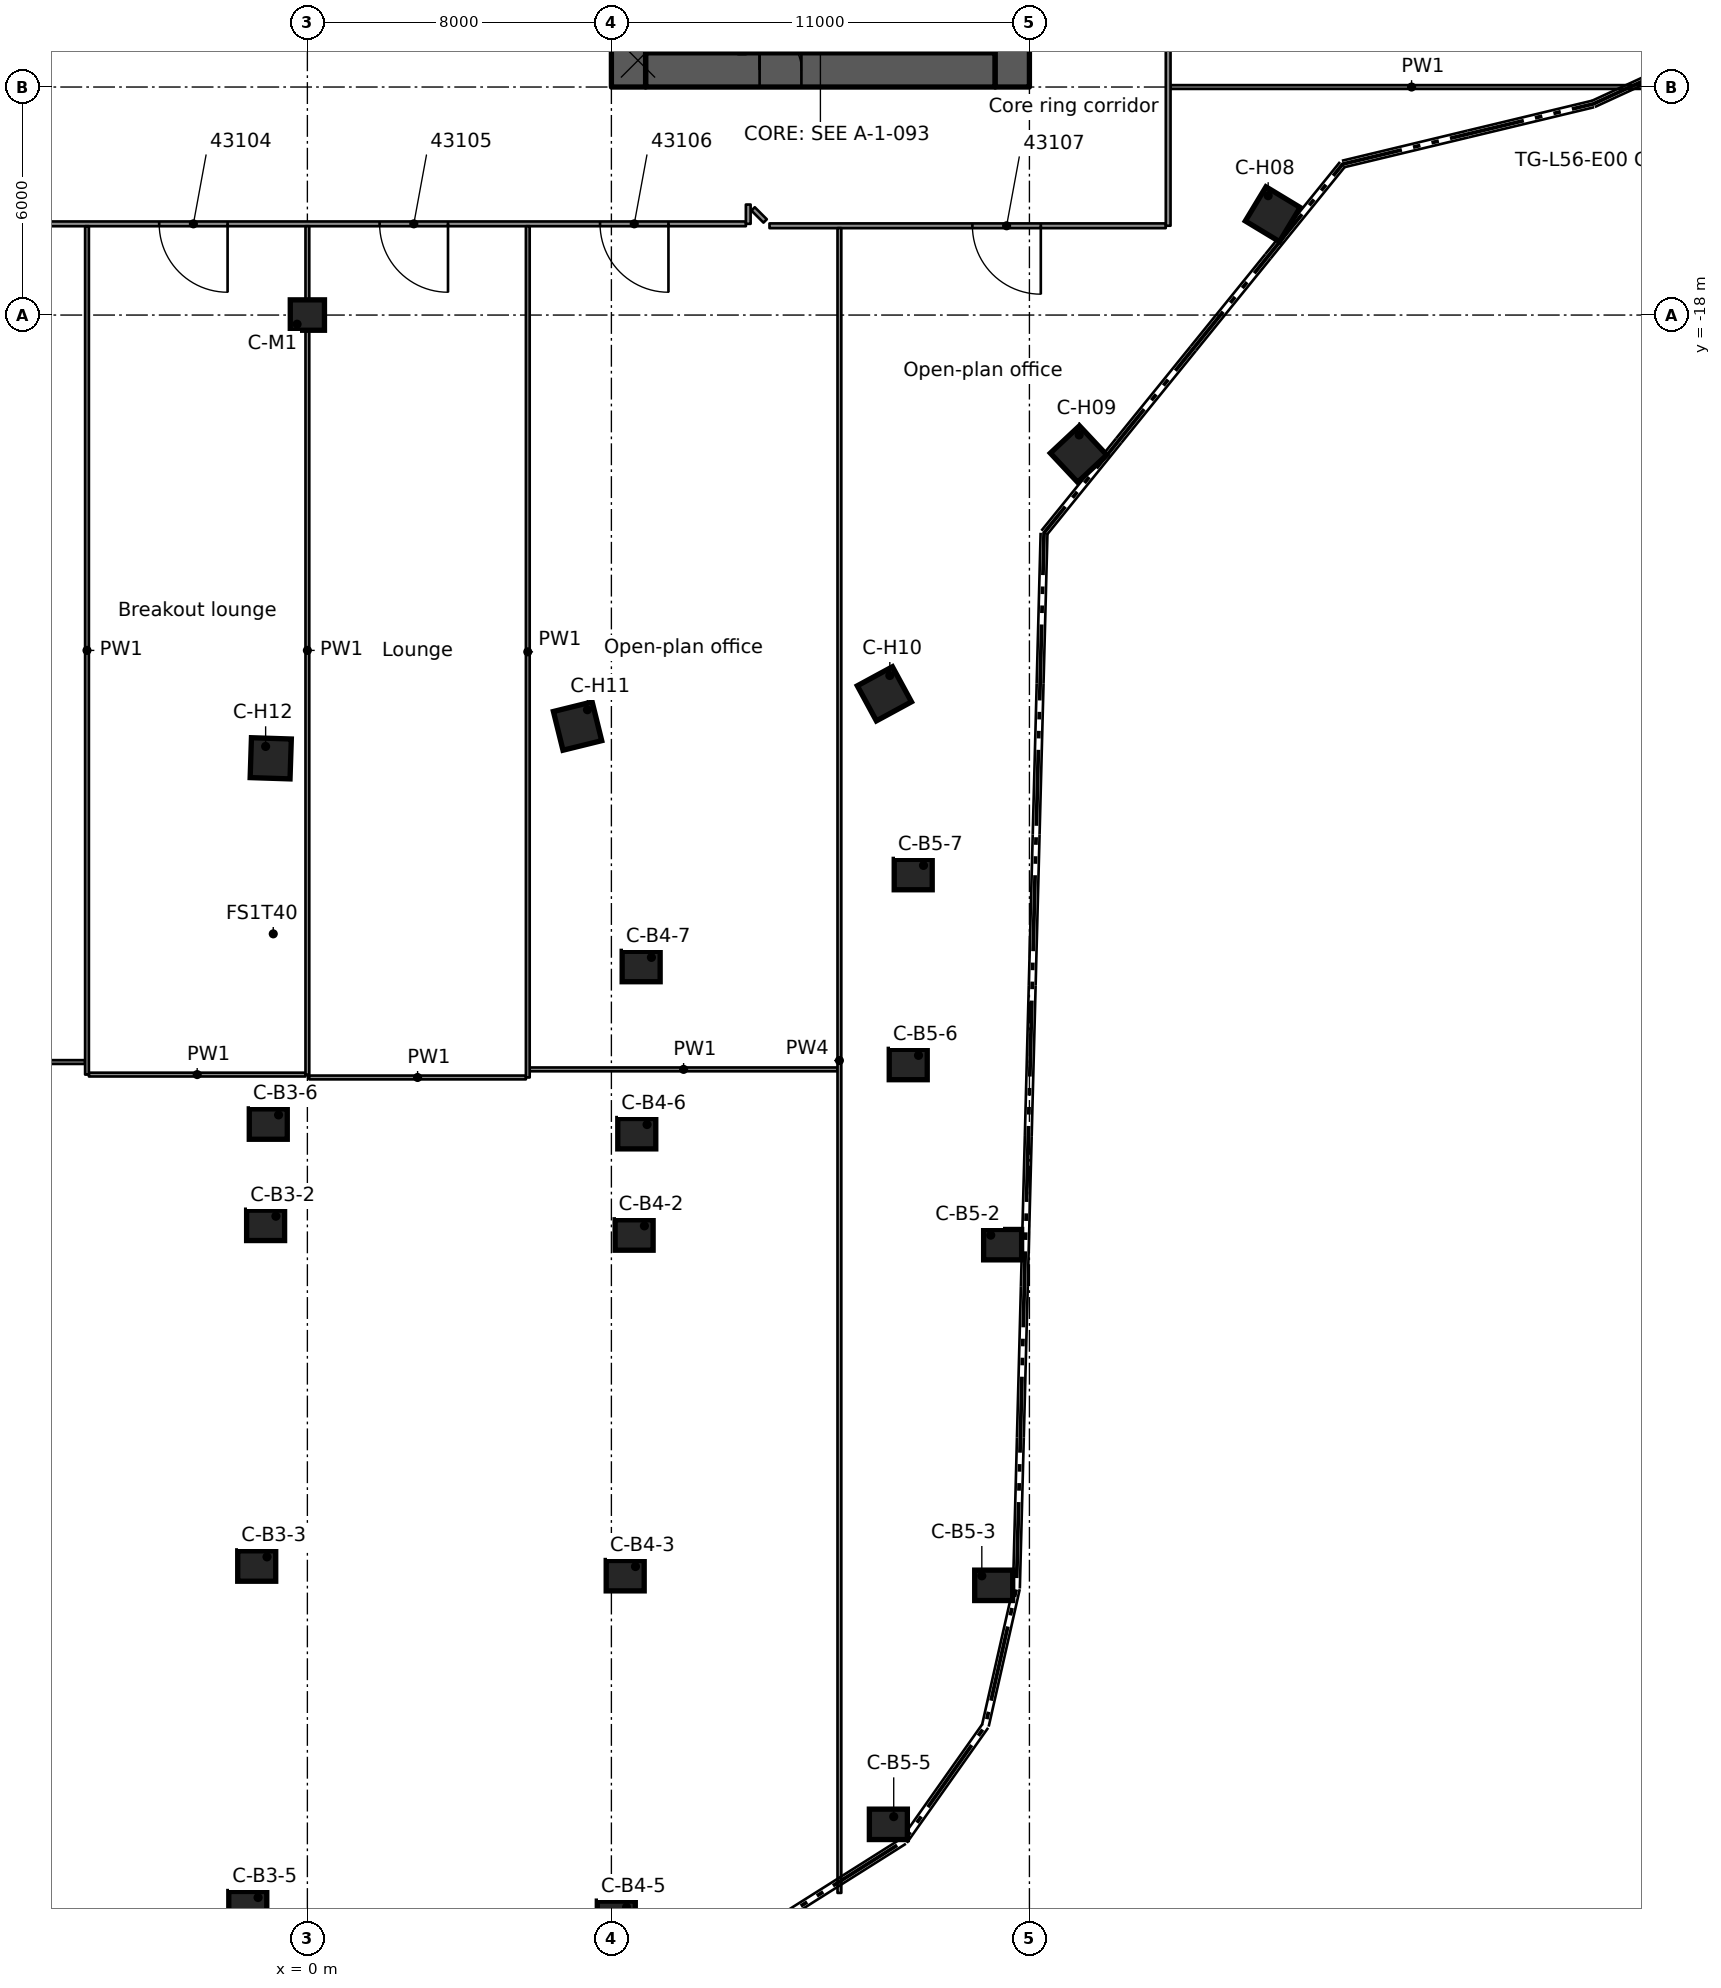
"""IFC4 building model, lengths in metres.
Left out: names, types, materials, properties, quantities, classifications, styles, units other than length and angle.
Written with IfcOpenShell. Run it as: python <this file> out.ifc"""

import sys

from ifc_helpers import new_model, si_unit, direction, frame, frame_2d, origin, origin_2d, place, context, subcontext, project, spatial, rectangle, extrude, element, fill, save


model = new_model("IFC4")
c1 = context("Model", 3, precision=1e-05, world=origin(), true_north=direction((0.0, 1.0)))
c2 = subcontext(c1, "Body", "Model", "MODEL_VIEW")
j1 = project(units=[si_unit("LENGTHUNIT", "METRE"), si_unit("PLANEANGLEUNIT", "RADIAN")], contexts=[c1])
p1 = place(None, origin())
s1 = spatial("IfcSite", under=j1, at=p1, CompositionType="ELEMENT")
p2 = place(p1, origin())
s2 = spatial("IfcBuilding", under=s1, at=p2, CompositionType="ELEMENT")
p3 = place(p2, frame((0.0, 0.0, 214.0)))
s3 = spatial("IfcBuildingStorey", under=s2, at=p3, CompositionType="ELEMENT", Elevation=214.0)
p4 = place(p3, frame((8.9, -11.55, 0.0), z_axis=(0.0, 0.0, 1.0), x_axis=(1.0, 0.0, 0.0)))
e1 = element("IfcWall", 1, at=p4, inside=s3, PredefinedType="SHEAR", context=c2, shape_type="SweptSolid", body=[
    extrude(rectangle(XDim=9.2, YDim=0.9, at=frame_2d((4.6, 0.0))), origin(), (0.0, 0.0, 1.0), 3.5),
])
p5 = place(p4, frame((3.0, 0.0, 0.0)))
e2 = element("IfcOpeningElement", 2, at=p5, cuts=e1, PredefinedType="OPENING", context=c2, shape_type="SweptSolid", body=[
    extrude(rectangle(XDim=1.1, YDim=2.1, at=frame_2d((0.55, 1.05))), frame((0.0, 0.46, 0.0), z_axis=(0.0, -1.0, 0.0), x_axis=(1.0, 0.0, 0.0)), (0.0, 0.0, 1.0), 0.92),
])
p6 = place(p3, frame((8.45, -12.0, 0.0), z_axis=(0.0, 0.0, 1.0), x_axis=(0.0, 1.0, 0.0)))
e3 = element("IfcWall", 3, at=p6, inside=s3, PredefinedType="SHEAR", context=c2, shape_type="SweptSolid", body=[
    extrude(rectangle(XDim=24.0, YDim=0.9, at=frame_2d((12.0, 0.0))), origin(), (0.0, 0.0, 1.0), 3.5),
])
p7 = place(p6, frame((12.6, 0.0, 0.0)))
e4 = element("IfcOpeningElement", 4, at=p7, cuts=e3, PredefinedType="OPENING", context=c2, shape_type="SweptSolid", body=[
    extrude(rectangle(XDim=1.8, YDim=2.1, at=frame_2d((0.9, 1.05))), frame((0.0, 0.46, 0.0), z_axis=(0.0, -1.0, 0.0), x_axis=(1.0, 0.0, 0.0)), (0.0, 0.0, 1.0), 0.92),
])
p8 = place(p6, frame((3.25, 0.0, 0.0)))
e5 = element("IfcOpeningElement", 5, at=p8, cuts=e3, PredefinedType="OPENING", context=c2, shape_type="SweptSolid", body=[
    extrude(rectangle(XDim=1.1, YDim=2.1, at=frame_2d((0.55, 1.05))), frame((0.0, 0.46, 0.0), z_axis=(0.0, -1.0, 0.0), x_axis=(1.0, 0.0, 0.0)), (0.0, 0.0, 1.0), 0.92),
])
p9 = place(p6, frame((21.0, 0.0, 0.0)))
e6 = element("IfcOpeningElement", 6, at=p9, cuts=e3, PredefinedType="OPENING", context=c2, shape_type="SweptSolid", body=[
    extrude(rectangle(XDim=0.8, YDim=2.1, at=frame_2d((0.4, 1.05))), frame((0.0, 0.46, 0.0), z_axis=(0.0, -1.0, 0.0), x_axis=(1.0, 0.0, 0.0)), (0.0, 0.0, 1.0), 0.92),
])
p10 = place(p3, frame((18.55, -12.0, 0.0), z_axis=(0.0, 0.0, 1.0), x_axis=(0.0, 1.0, 0.0)))
e7 = element("IfcWall", 7, at=p10, inside=s3, PredefinedType="SHEAR", context=c2, shape_type="SweptSolid", body=[
    extrude(rectangle(XDim=24.0, YDim=0.9, at=frame_2d((12.0, 0.0))), origin(), (0.0, 0.0, 1.0), 3.5),
])
p11 = place(p10, frame((12.1, 0.0, 0.0)))
e8 = element("IfcOpeningElement", 8, at=p11, cuts=e7, PredefinedType="OPENING", context=c2, shape_type="SweptSolid", body=[
    extrude(rectangle(XDim=1.8, YDim=2.1, at=frame_2d((0.9, 1.05))), frame((0.0, 0.46, 0.0), z_axis=(0.0, -1.0, 0.0), x_axis=(1.0, 0.0, 0.0)), (0.0, 0.0, 1.0), 0.92),
])
for number, where, z_axis, x_axis in (
    (9, (-1.099, -41.952, 0.0), (0.0, 0.0, 1.0), (1.0, 0.0, 0.0)),
    (10, (-1.333, -50.916, 0.0), (0.0, 0.0, 1.0), (1.0, 0.0, 0.0)),
    (11, (-1.568, -59.879, 0.0), (0.0, 0.0, 1.0), (1.0, 0.0, 0.0)),
    (12, (-1.029, -39.287, 0.0), (0.0, 0.0, 1.0), (1.0, 0.0, 0.0)),
    (13, (8.598, -42.206, 0.0), (0.0, 0.0, 1.0), (1.0, 0.0, 0.0)),
    (14, (8.363, -51.17, 0.0), (0.0, 0.0, 1.0), (1.0, 0.0, 0.0)),
    (15, (8.129, -60.133, 0.0), (0.0, 0.0, 1.0), (1.0, 0.0, 0.0)),
    (16, (8.668, -39.54, 0.0), (0.0, 0.0, 1.0), (1.0, 0.0, 0.0)),
    (17, (8.783, -35.142, 0.0), (0.0, 0.0, 1.0), (1.0, 0.0, 0.0)),
    (18, (18.295, -42.46, 0.0), (0.0, 0.0, 1.0), (1.0, 0.0, 0.0)),
    (19, (18.06, -51.424, 0.0), (0.0, 0.0, 1.0), (1.0, 0.0, 0.0)),
    (20, (15.288, -57.713, 0.0), (0.0, 0.0, 1.0), (1.0, 0.0, 0.0)),
    (21, (15.811, -37.72, 0.0), (0.0, 0.0, 1.0), (1.0, 0.0, 0.0)),
    (22, (15.942, -32.722, 0.0), (0.0, 0.0, 1.0), (1.0, 0.0, 0.0)),
):
    element("IfcColumn", number, at=place(p3, frame(where, z_axis=z_axis, x_axis=x_axis)), inside=s3, PredefinedType="COLUMN", context=c2, shape_type="SweptSolid", body=[
        extrude(rectangle(XDim=1.0, YDim=0.8, at=origin_2d()), origin(), (0.0, 0.0, 1.0), 3.5),
    ])
for number, where, z_axis, x_axis in (
    (23, (25.403, -15.347, 0.0), (0.0, 0.0, 1.0), (0.856, -0.517, 0.0)),
    (24, (20.293, -21.657, 0.0), (0.0, 0.0, 1.0), (0.684, -0.73, 0.0)),
    (25, (15.184, -27.966, 0.0), (0.0, 0.0, 1.0), (0.477, -0.879, 0.0)),
    (26, (7.11, -28.815, 0.0), (0.0, 0.0, 1.0), (0.24, -0.971, 0.0)),
    (27, (-0.964, -29.663, 0.0), (0.0, 0.0, 1.0), (-0.032, -0.999, 0.0)),
):
    element("IfcColumn", number, at=place(p3, frame(where, z_axis=z_axis, x_axis=x_axis)), inside=s3, PredefinedType="COLUMN", context=c2, shape_type="SweptSolid", body=[
        extrude(rectangle(XDim=1.05, YDim=1.05, at=origin_2d()), origin(), (0.0, 0.0, 1.0), 3.5),
    ])
p12 = place(p3, frame((0.0, -18.0, 0.0), z_axis=(0.0, 0.0, 1.0), x_axis=(1.0, 0.0, 0.0)))
e28 = element("IfcColumn", 28, at=p12, inside=s3, PredefinedType="COLUMN", context=c2, shape_type="SweptSolid", body=[
    extrude(rectangle(XDim=0.9, YDim=0.8, at=origin_2d()), origin(), (0.0, 0.0, 1.0), 3.5),
])
p13 = place(p3, frame((11.44, -6.975, 0.0), z_axis=(0.0, 0.0, 1.0), x_axis=(0.0, -1.0, 0.0)))
e29 = element("IfcWall", 29, at=p13, inside=s3, PredefinedType="SOLIDWALL", context=c2, shape_type="SweptSolid", body=[
    extrude(rectangle(XDim=4.125, YDim=0.2, at=frame_2d((2.062, 0.0))), origin(), (0.0, 0.0, 1.0), 3.08),
])
p14 = place(p13, frame((2.1, 0.0, 0.0)))
e30 = element("IfcOpeningElement", 30, at=p14, cuts=e29, PredefinedType="OPENING", context=c2, shape_type="SweptSolid", body=[
    extrude(rectangle(XDim=1.1, YDim=2.1, at=frame_2d((0.55, 1.05))), frame((0.0, 0.11, 0.0), z_axis=(0.0, -1.0, 0.0), x_axis=(1.0, 0.0, 0.0)), (0.0, 0.0, 1.0), 0.22),
])
p15 = place(p3, frame((11.729, -15.207, 0.0), z_axis=(0.0, 0.0, 1.0), x_axis=(0.707106781187, -0.707106781187, 0.0)))
e31 = element("IfcWall", 31, at=p15, inside=s3, PredefinedType="PARTITIONING", context=c2, shape_type="SweptSolid", body=[
    extrude(rectangle(XDim=0.448, YDim=0.125, at=frame_2d((0.224, 0.0))), origin(), (0.0, 0.0, 1.0), 3.06),
])
p16 = place(p3, frame((0.05, -38.061, 0.0), z_axis=(0.0, 0.0, 1.0), x_axis=(1.0, 0.0, 0.0)))
e32 = element("IfcWall", 32, at=p16, inside=s3, PredefinedType="PARTITIONING", context=c2, shape_type="SweptSolid", body=[
    extrude(rectangle(XDim=5.7, YDim=0.1, at=frame_2d((2.85, 0.0))), origin(), (0.0, 0.0, 1.0), 3.06),
])
p17 = place(p3, frame((-5.749, -37.985, 0.0), z_axis=(0.0, 0.0, 1.0), x_axis=(1.0, 0.0, 0.0)))
e33 = element("IfcWall", 33, at=p17, inside=s3, PredefinedType="PARTITIONING", context=c2, shape_type="SweptSolid", body=[
    extrude(rectangle(XDim=5.699, YDim=0.1, at=frame_2d((2.85, 0.0))), origin(), (0.0, 0.0, 1.0), 3.06),
])
p18 = place(p3, frame((5.85, -37.848, 0.0), z_axis=(0.0, 0.0, 1.0), x_axis=(1.0, 0.0, 0.0)))
e34 = element("IfcWall", 34, at=p18, inside=s3, PredefinedType="PARTITIONING", context=c2, shape_type="SweptSolid", body=[
    extrude(rectangle(XDim=8.1, YDim=0.1, at=frame_2d((4.05, 0.0))), origin(), (0.0, 0.0, 1.0), 3.06),
])
p19 = place(p3, frame((-13.95, -37.655, 0.0), z_axis=(0.0, 0.0, 1.0), x_axis=(1.0, 0.0, 0.0)))
e35 = element("IfcWall", 35, at=p19, inside=s3, PredefinedType="PARTITIONING", context=c2, shape_type="SweptSolid", body=[
    extrude(rectangle(XDim=8.101, YDim=0.1, at=frame_2d((4.05, 0.0))), origin(), (0.0, 0.0, 1.0), 3.06),
])
p20 = place(p3, frame((22.587, -15.651, 0.0), z_axis=(0.0, 0.0, 1.0), x_axis=(-1.0, 0.0, 0.0)))
e36 = element("IfcWall", 36, at=p20, inside=s3, PredefinedType="PARTITIONING", context=c2, shape_type="SweptSolid", body=[
    extrude(rectangle(XDim=10.427, YDim=0.125, at=frame_2d((5.213, 0.0))), origin(), (0.0, 0.0, 1.0), 3.06),
])
p21 = place(p20, frame((3.288, 0.0, 0.0)))
e37 = element("IfcOpeningElement", 37, at=p21, cuts=e36, PredefinedType="OPENING", context=c2, shape_type="SweptSolid", body=[
    extrude(rectangle(XDim=1.8, YDim=2.1, at=frame_2d((0.9, 1.05))), frame((0.0, 0.073, 0.0), z_axis=(0.0, -1.0, 0.0), x_axis=(1.0, 0.0, 0.0)), (0.0, 0.0, 1.0), 0.145),
])
p22 = place(p3, frame((11.539, -15.6, 0.0), z_axis=(0.0, 0.0, 1.0), x_axis=(-1.0, 0.0, 0.0)))
e38 = element("IfcWall", 38, at=p22, inside=s3, PredefinedType="PARTITIONING", context=c2, shape_type="SweptSolid", body=[
    extrude(rectangle(XDim=23.139, YDim=0.125, at=frame_2d((11.57, 0.0))), origin(), (0.0, 0.0, 1.0), 3.06),
])
p23 = place(p22, frame((19.688, 0.0, 0.0)))
e39 = element("IfcOpeningElement", 39, at=p23, cuts=e38, PredefinedType="OPENING", context=c2, shape_type="SweptSolid", body=[
    extrude(rectangle(XDim=0.9, YDim=2.1, at=frame_2d((0.45, 1.05))), frame((0.0, 0.073, 0.0), z_axis=(0.0, -1.0, 0.0), x_axis=(1.0, 0.0, 0.0)), (0.0, 0.0, 1.0), 0.145),
])
p24 = place(p22, frame((13.638, 0.0, 0.0)))
e40 = element("IfcOpeningElement", 40, at=p24, cuts=e38, PredefinedType="OPENING", context=c2, shape_type="SweptSolid", body=[
    extrude(rectangle(XDim=1.8, YDim=2.1, at=frame_2d((0.9, 1.05))), frame((0.0, 0.073, 0.0), z_axis=(0.0, -1.0, 0.0), x_axis=(1.0, 0.0, 0.0)), (0.0, 0.0, 1.0), 0.145),
])
p25 = place(p22, frame((7.838, 0.0, 0.0)))
e41 = element("IfcOpeningElement", 41, at=p25, cuts=e38, PredefinedType="OPENING", context=c2, shape_type="SweptSolid", body=[
    extrude(rectangle(XDim=1.8, YDim=2.1, at=frame_2d((0.9, 1.05))), frame((0.0, 0.073, 0.0), z_axis=(0.0, -1.0, 0.0), x_axis=(1.0, 0.0, 0.0)), (0.0, 0.0, 1.0), 0.145),
])
p26 = place(p22, frame((2.038, 0.0, 0.0)))
e42 = element("IfcOpeningElement", 42, at=p26, cuts=e38, PredefinedType="OPENING", context=c2, shape_type="SweptSolid", body=[
    extrude(rectangle(XDim=1.8, YDim=2.1, at=frame_2d((0.9, 1.05))), frame((0.0, 0.073, 0.0), z_axis=(0.0, -1.0, 0.0), x_axis=(1.0, 0.0, 0.0)), (0.0, 0.0, 1.0), 0.145),
])
p27 = place(p3, frame((22.713, -12.0, 0.0), z_axis=(0.0, 0.0, 1.0), x_axis=(1.0, 0.0, 0.0)))
e43 = element("IfcWall", 43, at=p27, inside=s3, PredefinedType="PARTITIONING", context=c2, shape_type="SweptSolid", body=[
    extrude(rectangle(XDim=12.686, YDim=0.1, at=frame_2d((6.343, 0.0))), origin(), (0.0, 0.0, 1.0), 3.06),
])
p28 = place(p3, frame((22.651, 15.65, 0.0), z_axis=(0.0, 0.0, 1.0), x_axis=(0.0, -1.0, 0.0)))
e44 = element("IfcWall", 44, at=p28, inside=s3, PredefinedType="PARTITIONING", context=c2, shape_type="SweptSolid", body=[
    extrude(rectangle(XDim=31.3, YDim=0.125, at=frame_2d((15.65, 0.0))), origin(), (0.0, 0.0, 1.0), 3.06),
])
p29 = place(p28, frame((20.75, 0.0, 0.0)))
e45 = element("IfcOpeningElement", 45, at=p29, cuts=e44, PredefinedType="OPENING", context=c2, shape_type="SweptSolid", body=[
    extrude(rectangle(XDim=1.8, YDim=2.1, at=frame_2d((0.9, 1.05))), frame((0.0, 0.073, 0.0), z_axis=(0.0, -1.0, 0.0), x_axis=(1.0, 0.0, 0.0)), (0.0, 0.0, 1.0), 0.145),
])
p30 = place(p28, frame((8.75, 0.0, 0.0)))
e46 = element("IfcOpeningElement", 46, at=p30, cuts=e44, PredefinedType="OPENING", context=c2, shape_type="SweptSolid", body=[
    extrude(rectangle(XDim=1.8, YDim=2.1, at=frame_2d((0.9, 1.05))), frame((0.0, 0.073, 0.0), z_axis=(0.0, -1.0, 0.0), x_axis=(1.0, 0.0, 0.0)), (0.0, 0.0, 1.0), 0.145),
])
p31 = place(p3, frame((14.0, -59.517, 0.0), z_axis=(0.0, 0.0, 1.0), x_axis=(0.0, 1.0, 0.0)))
e47 = element("IfcWall", 47, at=p31, inside=s3, PredefinedType="PARTITIONING", context=c2, shape_type="SweptSolid", body=[
    extrude(rectangle(XDim=43.804, YDim=0.1, at=frame_2d((21.902, 0.0))), origin(), (0.0, 0.0, 1.0), 2.425),
])
p32 = place(p3, frame((11.601, -15.6, 0.0), z_axis=(0.0, 0.0, 1.0), x_axis=(0.0, 1.0, 0.0)))
e48 = element("IfcWall", 48, at=p32, inside=s3, PredefinedType="PARTITIONING", context=c2, shape_type="SweptSolid", body=[
    extrude(rectangle(XDim=0.508, YDim=0.125, at=frame_2d((0.254, 0.0))), origin(), (0.0, 0.0, 1.0), 3.06),
])
p33 = place(p3, frame((5.8, -38.061, 0.0), z_axis=(0.0, 0.0, 1.0), x_axis=(0.0, 1.0, 0.0)))
e49 = element("IfcWall", 49, at=p33, inside=s3, PredefinedType="PARTITIONING", context=c2, shape_type="SweptSolid", body=[
    extrude(rectangle(XDim=22.399, YDim=0.1, at=frame_2d((11.199, 0.0))), origin(), (0.0, 0.0, 1.0), 3.06),
])
for number, where, z_axis, x_axis in (
    (50, (0.0, -37.985, 0.0), (0.0, 0.0, 1.0), (0.0, 1.0, 0.0)),
    (51, (-5.799, -37.985, 0.0), (0.0, 0.0, 1.0), (0.0, 1.0, 0.0)),
):
    element("IfcWall", number, at=place(p3, frame(where, z_axis=z_axis, x_axis=x_axis)), inside=s3, PredefinedType="PARTITIONING", context=c2, shape_type="SweptSolid", body=[
        extrude(rectangle(XDim=22.323, YDim=0.1, at=frame_2d((11.162, 0.0))), origin(), (0.0, 0.0, 1.0), 3.06),
    ])
p34 = place(p5, origin())
e52 = element("IfcDoor", 52, at=p34, inside=s3, OperationType="SINGLE_SWING_LEFT", PredefinedType="DOOR", context=c2, shape_type="SweptSolid", body=[
    extrude(rectangle(XDim=1.1, YDim=2.1, at=frame_2d((0.55, 1.05))), frame((0.0, 0.025, 0.0), z_axis=(0.0, -1.0, 0.0), x_axis=(1.0, 0.0, 0.0)), (0.0, 0.0, 1.0), 0.05),
])
fill(e2, e52)
p35 = place(p24, origin())
e53 = element("IfcDoor", 53, at=p35, inside=s3, OperationType="DOUBLE_DOOR_SINGLE_SWING", PredefinedType="DOOR", context=c2, shape_type="SweptSolid", body=[
    extrude(rectangle(XDim=1.8, YDim=2.1, at=frame_2d((0.9, 1.05))), frame((0.0, 0.025, 0.0), z_axis=(0.0, -1.0, 0.0), x_axis=(1.0, 0.0, 0.0)), (0.0, 0.0, 1.0), 0.05),
])
fill(e40, e53)
p36 = place(p25, origin())
e54 = element("IfcDoor", 54, at=p36, inside=s3, OperationType="DOUBLE_DOOR_SINGLE_SWING", PredefinedType="DOOR", context=c2, shape_type="SweptSolid", body=[
    extrude(rectangle(XDim=1.8, YDim=2.1, at=frame_2d((0.9, 1.05))), frame((0.0, 0.025, 0.0), z_axis=(0.0, -1.0, 0.0), x_axis=(1.0, 0.0, 0.0)), (0.0, 0.0, 1.0), 0.05),
])
fill(e41, e54)
p37 = place(p26, origin())
e55 = element("IfcDoor", 55, at=p37, inside=s3, OperationType="DOUBLE_DOOR_SINGLE_SWING", PredefinedType="DOOR", context=c2, shape_type="SweptSolid", body=[
    extrude(rectangle(XDim=1.8, YDim=2.1, at=frame_2d((0.9, 1.05))), frame((0.0, 0.025, 0.0), z_axis=(0.0, -1.0, 0.0), x_axis=(1.0, 0.0, 0.0)), (0.0, 0.0, 1.0), 0.05),
])
fill(e42, e55)
p38 = place(p21, origin())
e56 = element("IfcDoor", 56, at=p38, inside=s3, OperationType="DOUBLE_DOOR_SINGLE_SWING", PredefinedType="DOOR", context=c2, shape_type="SweptSolid", body=[
    extrude(rectangle(XDim=1.8, YDim=2.1, at=frame_2d((0.9, 1.05))), frame((0.0, 0.025, 0.0), z_axis=(0.0, -1.0, 0.0), x_axis=(1.0, 0.0, 0.0)), (0.0, 0.0, 1.0), 0.05),
])
fill(e37, e56)
save(model, sys.argv[1])
